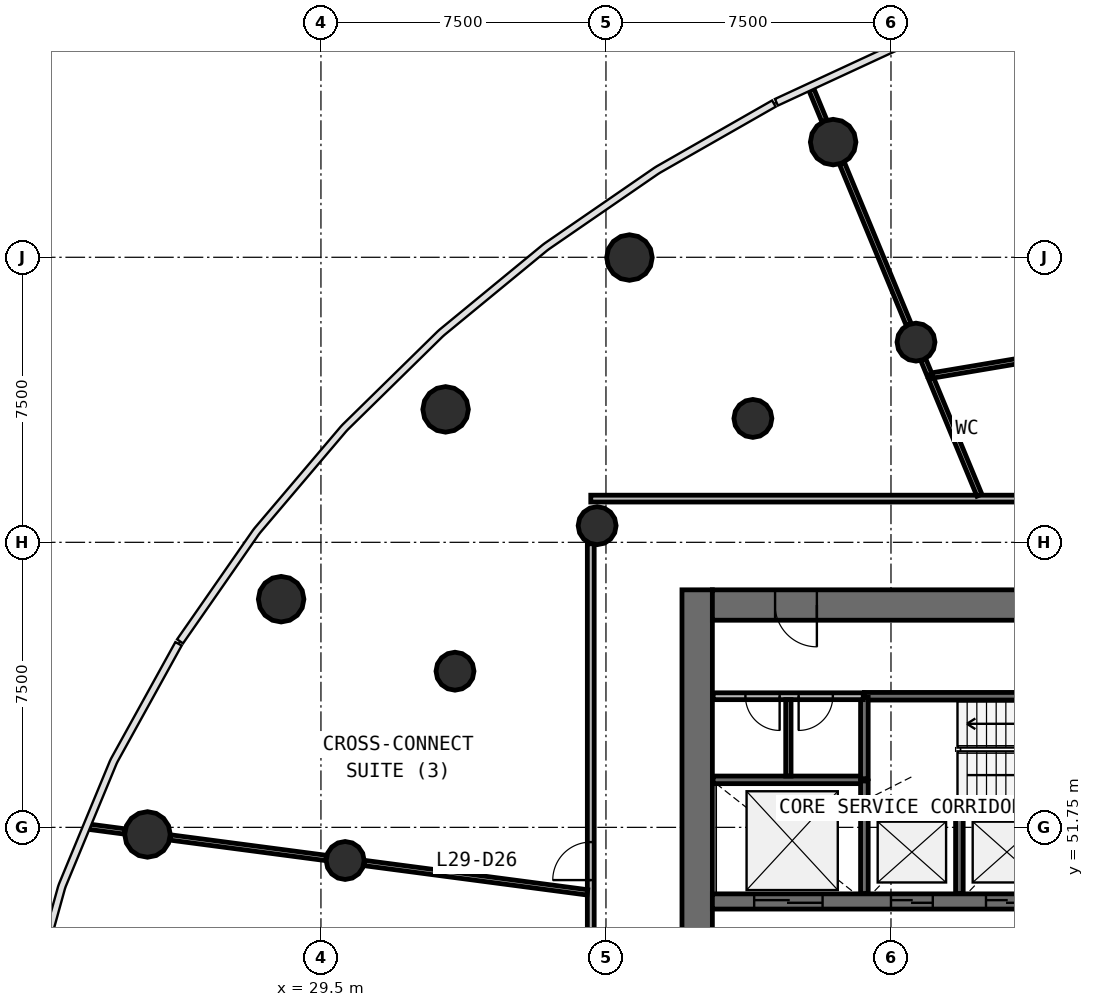
"""IFC4 building model, lengths in metres.
Left out: names, types, materials, properties, quantities, classifications, styles, units other than length and angle.
Written with IfcOpenShell. Run it as: python <this file> out.ifc"""

import sys

from ifc_helpers import new_model, si_unit, direction, frame, frame_2d, origin, origin_2d, place, context, subcontext, project, spatial, rectangle, circle, extrude, source, transform, mapped, element, fill, save


model = new_model("IFC4")
c1 = context("Model", 3, precision=1e-05, world=origin(), true_north=direction((0.0, 1.0)))
c2 = subcontext(c1, "Body", "Model", "MODEL_VIEW")
j1 = project(units=[si_unit("LENGTHUNIT", "METRE"), si_unit("PLANEANGLEUNIT", "RADIAN")], contexts=[c1])
p1 = place(None, origin())
s1 = spatial("IfcSite", under=j1, at=p1, CompositionType="ELEMENT")
p2 = place(p1, origin())
s2 = spatial("IfcBuilding", under=s1, at=p2, CompositionType="ELEMENT")
p3 = place(p2, frame((0.0, 0.0, 124.9)))
s3 = spatial("IfcBuildingStorey", under=s2, at=p3, CompositionType="ELEMENT", Elevation=124.9)
p4 = place(p3, frame((39.4, 58.0, 0.0), z_axis=(0.0, 0.0, 1.0), x_axis=(0.0, -1.0, 0.0)))
e1 = element("IfcWall", 1, at=p4, inside=s3, PredefinedType="SHEAR", context=c2, shape_type="SweptSolid", body=[
    extrude(rectangle(XDim=20.0, YDim=0.8, at=frame_2d((10.0, 0.0))), origin(), (0.0, 0.0, 1.0), 4.1),
])
p5 = place(p4, frame((9.1, 0.0, 0.0)))
e2 = element("IfcOpeningElement", 2, at=p5, cuts=e1, PredefinedType="OPENING", context=c2, shape_type="SweptSolid", body=[
    extrude(rectangle(XDim=1.8, YDim=2.1, at=frame_2d((0.9, 1.05))), frame((0.0, 0.41, 0.0), z_axis=(0.0, -1.0, 0.0), x_axis=(1.0, 0.0, 0.0)), (0.0, 0.0, 1.0), 0.82),
])
p6 = place(p3, frame((64.2, 57.6, 0.0), z_axis=(0.0, 0.0, 1.0), x_axis=(-1.0, 0.0, 0.0)))
e3 = element("IfcWall", 3, at=p6, inside=s3, PredefinedType="SHEAR", context=c2, shape_type="SweptSolid", body=[
    extrude(rectangle(XDim=24.4, YDim=0.8, at=frame_2d((12.2, 0.0))), origin(), (0.0, 0.0, 1.0), 4.1),
])
p7 = place(p6, frame((21.65, 0.0, 0.0)))
e4 = element("IfcOpeningElement", 4, at=p7, cuts=e3, PredefinedType="OPENING", context=c2, shape_type="SweptSolid", body=[
    extrude(rectangle(XDim=1.1, YDim=2.1, at=frame_2d((0.55, 1.05))), frame((0.0, 0.41, 0.0), z_axis=(0.0, -1.0, 0.0), x_axis=(1.0, 0.0, 0.0)), (0.0, 0.0, 1.0), 0.82),
])
p8 = place(p6, frame((2.15, 0.0, 0.0)))
e5 = element("IfcOpeningElement", 5, at=p8, cuts=e3, PredefinedType="OPENING", context=c2, shape_type="SweptSolid", body=[
    extrude(rectangle(XDim=1.1, YDim=2.1, at=frame_2d((0.55, 1.05))), frame((0.0, 0.41, 0.0), z_axis=(0.0, -1.0, 0.0), x_axis=(1.0, 0.0, 0.0)), (0.0, 0.0, 1.0), 0.82),
])
p9 = place(p3, frame((39.8, 49.8, 0.0), z_axis=(0.0, 0.0, 1.0), x_axis=(1.0, 0.0, 0.0)))
e6 = element("IfcWall", 6, at=p9, inside=s3, PredefinedType="SHEAR", context=c2, shape_type="SweptSolid", body=[
    extrude(rectangle(XDim=24.4, YDim=0.4, at=frame_2d((12.2, 0.0))), origin(), (0.0, 0.0, 1.0), 4.1),
])
p10 = place(p9, frame((4.7, 0.0, 0.0)))
e7 = element("IfcOpeningElement", 7, at=p10, cuts=e6, PredefinedType="OPENING", context=c2, shape_type="SweptSolid", body=[
    extrude(rectangle(XDim=1.1, YDim=2.1, at=frame_2d((0.55, 1.05))), frame((0.0, 0.21, 0.0), z_axis=(0.0, -1.0, 0.0), x_axis=(1.0, 0.0, 0.0)), (0.0, 0.0, 1.0), 0.42),
])
p11 = place(p9, frame((7.2, 0.0, 0.0)))
e8 = element("IfcOpeningElement", 8, at=p11, cuts=e6, PredefinedType="OPENING", context=c2, shape_type="SweptSolid", body=[
    extrude(rectangle(XDim=1.1, YDim=2.1, at=frame_2d((0.55, 1.05))), frame((0.0, 0.21, 0.0), z_axis=(0.0, -1.0, 0.0), x_axis=(1.0, 0.0, 0.0)), (0.0, 0.0, 1.0), 0.42),
])
p12 = place(p9, frame((9.7, 0.0, 0.0)))
e9 = element("IfcOpeningElement", 9, at=p12, cuts=e6, PredefinedType="OPENING", context=c2, shape_type="SweptSolid", body=[
    extrude(rectangle(XDim=1.1, YDim=2.1, at=frame_2d((0.55, 1.05))), frame((0.0, 0.21, 0.0), z_axis=(0.0, -1.0, 0.0), x_axis=(1.0, 0.0, 0.0)), (0.0, 0.0, 1.0), 0.42),
])
p13 = place(p9, frame((1.1, 0.0, 0.0)))
e10 = element("IfcOpeningElement", 10, at=p13, cuts=e6, PredefinedType="OPENING", context=c2, shape_type="SweptSolid", body=[
    extrude(rectangle(XDim=1.8, YDim=2.4, at=frame_2d((0.9, 1.2))), frame((0.0, 0.21, 0.0), z_axis=(0.0, -1.0, 0.0), x_axis=(1.0, 0.0, 0.0)), (0.0, 0.0, 1.0), 0.42),
])
p14 = place(p9, frame((20.65, 0.0, 0.0)))
e11 = element("IfcOpeningElement", 11, at=p14, cuts=e6, PredefinedType="OPENING", context=c2, shape_type="SweptSolid", body=[
    extrude(rectangle(XDim=0.9, YDim=2.1, at=frame_2d((0.45, 1.05))), frame((0.0, 0.21, 0.0), z_axis=(0.0, -1.0, 0.0), x_axis=(1.0, 0.0, 0.0)), (0.0, 0.0, 1.0), 0.42),
])
p15 = place(p9, frame((11.85, 0.0, 0.0)))
e12 = element("IfcOpeningElement", 12, at=p15, cuts=e6, PredefinedType="OPENING", context=c2, shape_type="SweptSolid", body=[
    extrude(rectangle(XDim=0.9, YDim=2.1, at=frame_2d((0.45, 1.05))), frame((0.0, 0.21, 0.0), z_axis=(0.0, -1.0, 0.0), x_axis=(1.0, 0.0, 0.0)), (0.0, 0.0, 1.0), 0.42),
])
m1 = source(origin(), c2, "Body", "SweptSolid", [
    extrude(circle(Radius=0.6, at=origin_2d()), origin(), (0.0, 0.0, 1.0), 4.1),
])
for number, where, z_axis, x_axis in (
    (13, (42.978, 69.781, 0.0), (0.0, 0.0, 1.0), (1.0, 0.0, 0.0)),
    (14, (37.618, 66.743, 0.0), (0.0, 0.0, 1.0), (1.0, 0.0, 0.0)),
    (15, (32.78, 62.748, 0.0), (0.0, 0.0, 1.0), (1.0, 0.0, 0.0)),
    (16, (28.452, 57.754, 0.0), (0.0, 0.0, 1.0), (1.0, 0.0, 0.0)),
    (17, (24.936, 51.563, 0.0), (0.0, 0.0, 1.0), (1.0, 0.0, 0.0)),
):
    element("IfcColumn", number, at=place(p3, frame(where, z_axis=z_axis, x_axis=x_axis)), inside=s3, PredefinedType="COLUMN", context=c2, shape_type="MappedRepresentation", body=[
        mapped(m1, transform((0.0, 0.0, 0.0), scale=1.0)),
    ])
m2 = source(origin(), c2, "Body", "SweptSolid", [
    extrude(circle(Radius=0.5, at=origin_2d()), origin(), (0.0, 0.0, 1.0), 4.1),
])
for number, where, z_axis, x_axis in (
    (18, (45.158, 64.518, 0.0), (0.0, 0.0, 1.0), (1.0, 0.0, 0.0)),
    (19, (40.866, 62.51, 0.0), (0.0, 0.0, 1.0), (1.0, 0.0, 0.0)),
    (20, (36.768, 59.688, 0.0), (0.0, 0.0, 1.0), (1.0, 0.0, 0.0)),
    (21, (33.028, 55.859, 0.0), (0.0, 0.0, 1.0), (1.0, 0.0, 0.0)),
    (22, (30.137, 50.878, 0.0), (0.0, 0.0, 1.0), (1.0, 0.0, 0.0)),
):
    element("IfcColumn", number, at=place(p3, frame(where, z_axis=z_axis, x_axis=x_axis)), inside=s3, PredefinedType="COLUMN", context=c2, shape_type="MappedRepresentation", body=[
        mapped(m2, transform((0.0, 0.0, 0.0), scale=1.0)),
    ])
p16 = place(p3, frame((50.4, 55.2, 0.0), z_axis=(0.0, 0.0, 1.0), x_axis=(-1.0, 0.0, 0.0)))
e23 = element("IfcWall", 23, at=p16, inside=s3, PredefinedType="SOLIDWALL", context=c2, shape_type="SweptSolid", body=[
    extrude(rectangle(XDim=6.6, YDim=0.2, at=frame_2d((3.3, 0.0))), origin(), (0.0, 0.0, 1.0), 3.6),
])
p17 = place(p16, frame((0.3, 0.0, 0.0)))
e24 = element("IfcOpeningElement", 24, at=p17, cuts=e23, PredefinedType="OPENING", context=c2, shape_type="SweptSolid", body=[
    extrude(rectangle(XDim=1.2, YDim=2.1, at=frame_2d((0.6, 1.05))), frame((0.0, 0.11, 0.0), z_axis=(0.0, -1.0, 0.0), x_axis=(1.0, 0.0, 0.0)), (0.0, 0.0, 1.0), 0.22),
])
p18 = place(p3, frame((43.8, 53.0, 0.0), z_axis=(0.0, 0.0, 1.0), x_axis=(-1.0, 0.0, 0.0)))
e25 = element("IfcWall", 25, at=p18, inside=s3, PredefinedType="SOLIDWALL", context=c2, shape_type="SweptSolid", body=[
    extrude(rectangle(XDim=3.98, YDim=0.2, at=frame_2d((1.99, 0.0))), origin(), (0.0, 0.0, 1.0), 3.6),
])
p19 = place(p3, frame((46.3, 52.4, 0.0), z_axis=(0.0, 0.0, 1.0), x_axis=(-1.0, 0.0, 0.0)))
e26 = element("IfcWall", 26, at=p19, inside=s3, PredefinedType="SOLIDWALL", context=c2, shape_type="SweptSolid", body=[
    extrude(rectangle(XDim=2.5, YDim=0.2, at=frame_2d((1.25, 0.0))), origin(), (0.0, 0.0, 1.0), 3.6),
])
p20 = place(p3, frame((48.8, 52.4, 0.0), z_axis=(0.0, 0.0, 1.0), x_axis=(-1.0, 0.0, 0.0)))
e27 = element("IfcWall", 27, at=p20, inside=s3, PredefinedType="SOLIDWALL", context=c2, shape_type="SweptSolid", body=[
    extrude(rectangle(XDim=2.47, YDim=0.2, at=frame_2d((1.235, 0.0))), origin(), (0.0, 0.0, 1.0), 3.6),
])
for number, where, z_axis, x_axis in (
    (28, (43.8, 52.37, 0.0), (0.0, 0.0, 1.0), (0.0, -1.0, 0.0)),
    (29, (46.3, 50.01, 0.0), (0.0, 0.0, 1.0), (0.0, 1.0, 0.0)),
):
    element("IfcWall", number, at=place(p3, frame(where, z_axis=z_axis, x_axis=x_axis)), inside=s3, PredefinedType="SOLIDWALL", context=c2, shape_type="SweptSolid", body=[
        extrude(rectangle(XDim=2.36, YDim=0.2, at=frame_2d((1.18, 0.0))), origin(), (0.0, 0.0, 1.0), 3.6),
    ])
p21 = place(p3, frame((43.8, 55.17, 0.0), z_axis=(0.0, 0.0, 1.0), x_axis=(0.0, -1.0, 0.0)))
e30 = element("IfcWall", 30, at=p21, inside=s3, PredefinedType="SOLIDWALL", context=c2, shape_type="SweptSolid", body=[
    extrude(rectangle(XDim=2.14, YDim=0.2, at=frame_2d((1.07, 0.0))), origin(), (0.0, 0.0, 1.0), 3.6),
])
p22 = place(p3, frame((43.8, 52.43, 0.0), z_axis=(0.0, 0.0, 1.0), x_axis=(0.0, 1.0, 0.0)))
e31 = element("IfcWall", 31, at=p22, inside=s3, PredefinedType="SOLIDWALL", context=c2, shape_type="SweptSolid", body=[
    extrude(rectangle(XDim=0.54, YDim=0.2, at=frame_2d((0.27, 0.0))), origin(), (0.0, 0.0, 1.0), 3.6),
])
p23 = place(p3, frame((36.6, 60.4, 0.0), z_axis=(0.0, 0.0, 1.0), x_axis=(1.0, 0.0, 0.0)))
e32 = element("IfcWall", 32, at=p23, inside=s3, PredefinedType="PARTITIONING", context=c2, shape_type="SweptSolid", body=[
    extrude(rectangle(XDim=30.8, YDim=0.18, at=frame_2d((15.4, 0.0))), origin(), (0.0, 0.0, 1.0), 2.8),
])
p24 = place(p23, frame((14.85, 0.0, 0.0)))
e33 = element("IfcOpeningElement", 33, at=p24, cuts=e32, PredefinedType="OPENING", context=c2, shape_type="SweptSolid", body=[
    extrude(rectangle(XDim=0.9, YDim=2.1, at=frame_2d((0.45, 1.05))), frame((0.0, 0.1, 0.0), z_axis=(0.0, -1.0, 0.0), x_axis=(1.0, 0.0, 0.0)), (0.0, 0.0, 1.0), 0.2),
])
p25 = place(p23, frame((12.65, 0.0, 0.0)))
e34 = element("IfcOpeningElement", 34, at=p25, cuts=e32, PredefinedType="OPENING", context=c2, shape_type="SweptSolid", body=[
    extrude(rectangle(XDim=0.9, YDim=2.1, at=frame_2d((0.45, 1.05))), frame((0.0, 0.1, 0.0), z_axis=(0.0, -1.0, 0.0), x_axis=(1.0, 0.0, 0.0)), (0.0, 0.0, 1.0), 0.2),
])
p26 = place(p23, frame((20.95, 0.0, 0.0)))
e35 = element("IfcOpeningElement", 35, at=p26, cuts=e32, PredefinedType="OPENING", context=c2, shape_type="SweptSolid", body=[
    extrude(rectangle(XDim=1.0, YDim=2.1, at=frame_2d((0.5, 1.05))), frame((0.0, 0.1, 0.0), z_axis=(0.0, -1.0, 0.0), x_axis=(1.0, 0.0, 0.0)), (0.0, 0.0, 1.0), 0.2),
])
p27 = place(p23, frame((17.35, 0.0, 0.0)))
e36 = element("IfcOpeningElement", 36, at=p27, cuts=e32, PredefinedType="OPENING", context=c2, shape_type="SweptSolid", body=[
    extrude(rectangle(XDim=1.0, YDim=2.1, at=frame_2d((0.5, 1.05))), frame((0.0, 0.1, 0.0), z_axis=(0.0, -1.0, 0.0), x_axis=(1.0, 0.0, 0.0)), (0.0, 0.0, 1.0), 0.2),
])
p28 = place(p3, frame((36.6, 35.63, 0.0), z_axis=(0.0, 0.0, 1.0), x_axis=(0.0, 1.0, 0.0)))
e37 = element("IfcWall", 37, at=p28, inside=s3, PredefinedType="PARTITIONING", context=c2, shape_type="SweptSolid", body=[
    extrude(rectangle(XDim=23.583, YDim=0.18, at=frame_2d((11.791, 0.0))), origin(), (0.0, 0.0, 1.0), 2.8),
])
p29 = place(p28, frame((14.732, 0.0, 0.0)))
e38 = element("IfcOpeningElement", 38, at=p29, cuts=e37, PredefinedType="OPENING", context=c2, shape_type="SweptSolid", body=[
    extrude(rectangle(XDim=1.0, YDim=2.1, at=frame_2d((0.5, 1.05))), frame((0.0, 0.1, 0.0), z_axis=(0.0, -1.0, 0.0), x_axis=(1.0, 0.0, 0.0)), (0.0, 0.0, 1.0), 0.2),
])
p30 = place(p28, frame((11.333, 0.0, 0.0)))
e39 = element("IfcOpeningElement", 39, at=p30, cuts=e37, PredefinedType="OPENING", context=c2, shape_type="SweptSolid", body=[
    extrude(rectangle(XDim=1.0, YDim=2.1, at=frame_2d((0.5, 1.05))), frame((0.0, 0.1, 0.0), z_axis=(0.0, -1.0, 0.0), x_axis=(1.0, 0.0, 0.0)), (0.0, 0.0, 1.0), 0.2),
])
p31 = place(p28, frame((9.133, 0.0, 0.0)))
e40 = element("IfcOpeningElement", 40, at=p31, cuts=e37, PredefinedType="OPENING", context=c2, shape_type="SweptSolid", body=[
    extrude(rectangle(XDim=1.0, YDim=2.1, at=frame_2d((0.5, 1.05))), frame((0.0, 0.1, 0.0), z_axis=(0.0, -1.0, 0.0), x_axis=(1.0, 0.0, 0.0)), (0.0, 0.0, 1.0), 0.2),
])
p32 = place(p3, frame((43.77, 55.2, 0.0), z_axis=(0.0, 0.0, 1.0), x_axis=(-1.0, 0.0, 0.0)))
e41 = element("IfcWall", 41, at=p32, inside=s3, PredefinedType="PARTITIONING", context=c2, shape_type="SweptSolid", body=[
    extrude(rectangle(XDim=3.95, YDim=0.18, at=frame_2d((1.975, 0.0))), origin(), (0.0, 0.0, 1.0), 3.6),
])
p33 = place(p32, frame((2.2, 0.0, 0.0)))
e42 = element("IfcOpeningElement", 42, at=p33, cuts=e41, PredefinedType="OPENING", context=c2, shape_type="SweptSolid", body=[
    extrude(rectangle(XDim=0.9, YDim=2.1, at=frame_2d((0.45, 1.05))), frame((0.0, 0.1, 0.0), z_axis=(0.0, -1.0, 0.0), x_axis=(1.0, 0.0, 0.0)), (0.0, 0.0, 1.0), 0.2),
])
p34 = place(p32, frame((0.8, 0.0, 0.0)))
e43 = element("IfcOpeningElement", 43, at=p34, cuts=e41, PredefinedType="OPENING", context=c2, shape_type="SweptSolid", body=[
    extrude(rectangle(XDim=0.9, YDim=2.1, at=frame_2d((0.45, 1.05))), frame((0.0, 0.1, 0.0), z_axis=(0.0, -1.0, 0.0), x_axis=(1.0, 0.0, 0.0)), (0.0, 0.0, 1.0), 0.2),
])
p35 = place(p3, frame((36.51, 50.039, 0.0), z_axis=(0.0, 0.0, 1.0), x_axis=(-0.991445034615, 0.130524876315, 0.0)))
e44 = element("IfcWall", 44, at=p35, inside=s3, PredefinedType="PARTITIONING", context=c2, shape_type="SweptSolid", body=[
    extrude(rectangle(XDim=5.924, YDim=0.14, at=frame_2d((2.962, 0.0))), origin(), (0.0, 0.0, 1.0), 2.8),
])
p36 = place(p3, frame((44.965, 64.984, 0.0), z_axis=(0.0, 0.0, 1.0), x_axis=(-0.382705930348, 0.923870213221, 0.0)))
e45 = element("IfcWall", 45, at=p36, inside=s3, PredefinedType="PARTITIONING", context=c2, shape_type="SweptSolid", body=[
    extrude(rectangle(XDim=4.587, YDim=0.14, at=frame_2d((2.293, 0.0))), origin(), (0.0, 0.0, 1.0), 2.8),
])
p37 = place(p3, frame((49.846, 64.358, 0.0), z_axis=(0.0, 0.0, 1.0), x_axis=(-0.986107812708, -0.166106537248, 0.0)))
e46 = element("IfcWall", 46, at=p37, inside=s3, PredefinedType="PARTITIONING", context=c2, shape_type="SweptSolid", body=[
    extrude(rectangle(XDim=4.381, YDim=0.14, at=frame_2d((2.191, 0.0))), origin(), (0.0, 0.0, 1.0), 2.8),
])
p38 = place(p3, frame((29.637, 50.944, 0.0), z_axis=(0.0, 0.0, 1.0), x_axis=(-0.991445054296, 0.130524726824, 0.0)))
e47 = element("IfcWall", 47, at=p38, inside=s3, PredefinedType="PARTITIONING", context=c2, shape_type="SweptSolid", body=[
    extrude(rectangle(XDim=4.137, YDim=0.14, at=frame_2d((2.069, 0.0))), origin(), (0.0, 0.0, 1.0), 2.8),
])
p39 = place(p3, frame((46.826, 60.49, 0.0), z_axis=(0.0, 0.0, 1.0), x_axis=(-0.382649947996, 0.92389340148, 0.0)))
e48 = element("IfcWall", 48, at=p39, inside=s3, PredefinedType="PARTITIONING", context=c2, shape_type="SweptSolid", body=[
    extrude(rectangle(XDim=3.327, YDim=0.14, at=frame_2d((1.663, 0.0))), origin(), (0.0, 0.0, 1.0), 2.8),
])
p40 = place(p3, frame((41.8, 53.1, 0.0), z_axis=(0.0, 0.0, 1.0), x_axis=(0.0, 1.0, 0.0)))
e49 = element("IfcWall", 49, at=p40, inside=s3, PredefinedType="PARTITIONING", context=c2, shape_type="SweptSolid", body=[
    extrude(rectangle(XDim=2.01, YDim=0.14, at=frame_2d((1.005, 0.0))), origin(), (0.0, 0.0, 1.0), 2.8),
])
p41 = place(p3, frame((24.336, 51.642, 0.0), z_axis=(0.0, 0.0, 1.0), x_axis=(-0.991449038396, 0.130494460661, 0.0)))
e50 = element("IfcWall", 50, at=p41, inside=s3, PredefinedType="PARTITIONING", context=c2, shape_type="SweptSolid", body=[
    extrude(rectangle(XDim=0.948, YDim=0.14, at=frame_2d((0.474, 0.0))), origin(), (0.0, 0.0, 1.0), 2.8),
])
p42 = place(p3, frame((42.747, 70.34, 0.0), z_axis=(0.0, 0.0, 1.0), x_axis=(-0.382657128341, 0.923890427556, 0.0)))
e51 = element("IfcWall", 51, at=p42, inside=s3, PredefinedType="PARTITIONING", context=c2, shape_type="SweptSolid", body=[
    extrude(rectangle(XDim=0.895, YDim=0.14, at=frame_2d((0.447, 0.0))), origin(), (0.0, 0.0, 1.0), 2.8),
])
p43 = place(p3, frame((45.514, 63.657, 0.0), z_axis=(0.0, 0.0, 1.0), x_axis=(-0.382334916259, 0.924023815607, 0.0)))
e52 = element("IfcWall", 52, at=p43, inside=s3, PredefinedType="PARTITIONING", context=c2, shape_type="SweptSolid", body=[
    extrude(rectangle(XDim=0.426, YDim=0.14, at=frame_2d((0.213, 0.0))), origin(), (0.0, 0.0, 1.0), 2.8),
])
m3 = source(origin(), c2, "Body", "SweptSolid", [
    extrude(rectangle(XDim=1.1, YDim=2.1, at=frame_2d((0.55, 1.05))), frame((0.0, 0.025, 0.0), z_axis=(0.0, -1.0, 0.0), x_axis=(1.0, 0.0, 0.0)), (0.0, 0.0, 1.0), 0.05),
])
p44 = place(p10, origin())
e53 = element("IfcDoor", 53, at=p44, inside=s3, OperationType="DOUBLE_DOOR_SLIDING", PredefinedType="USERDEFINED", context=c2, shape_type="MappedRepresentation", body=[
    mapped(m3, transform((0.0, 0.0, 0.0), scale=1.0)),
])
fill(e7, e53)
p45 = place(p11, origin())
e54 = element("IfcDoor", 54, at=p45, inside=s3, OperationType="DOUBLE_DOOR_SLIDING", PredefinedType="USERDEFINED", context=c2, shape_type="MappedRepresentation", body=[
    mapped(m3, transform((0.0, 0.0, 0.0), scale=1.0)),
])
fill(e8, e54)
m4 = source(origin(), c2, "Body", "SweptSolid", [
    extrude(rectangle(XDim=1.8, YDim=2.4, at=frame_2d((0.9, 1.2))), frame((0.0, 0.025, 0.0), z_axis=(0.0, -1.0, 0.0), x_axis=(1.0, 0.0, 0.0)), (0.0, 0.0, 1.0), 0.05),
])
p46 = place(p13, origin())
e55 = element("IfcDoor", 55, at=p46, inside=s3, OperationType="DOUBLE_DOOR_SLIDING", PredefinedType="USERDEFINED", context=c2, shape_type="MappedRepresentation", body=[
    mapped(m4, transform((0.0, 0.0, 0.0), scale=1.0)),
])
fill(e10, e55)
m5 = source(origin(), c2, "Body", "SweptSolid", [
    extrude(rectangle(XDim=1.1, YDim=2.1, at=frame_2d((0.55, 1.05))), frame((0.0, 0.025, 0.0), z_axis=(0.0, -1.0, 0.0), x_axis=(1.0, 0.0, 0.0)), (0.0, 0.0, 1.0), 0.05),
])
p47 = place(p7, origin())
e56 = element("IfcDoor", 56, at=p47, inside=s3, OperationType="SINGLE_SWING_LEFT", PredefinedType="DOOR", context=c2, shape_type="MappedRepresentation", body=[
    mapped(m5, transform((0.0, 0.0, 0.0), scale=1.0)),
])
fill(e4, e56)
m6 = source(origin(), c2, "Body", "SweptSolid", [
    extrude(rectangle(XDim=1.0, YDim=2.1, at=frame_2d((0.5, 1.05))), frame((0.0, 0.025, 0.0), z_axis=(0.0, -1.0, 0.0), x_axis=(1.0, 0.0, 0.0)), (0.0, 0.0, 1.0), 0.05),
])
p48 = place(p29, origin())
e57 = element("IfcDoor", 57, at=p48, inside=s3, OperationType="SINGLE_SWING_LEFT", PredefinedType="DOOR", context=c2, shape_type="MappedRepresentation", body=[
    mapped(m6, transform((0.0, 0.0, 0.0), scale=1.0)),
])
fill(e38, e57)
m7 = source(origin(), c2, "Body", "SweptSolid", [
    extrude(rectangle(XDim=0.9, YDim=2.1, at=frame_2d((0.45, 1.05))), frame((0.0, 0.025, 0.0), z_axis=(0.0, -1.0, 0.0), x_axis=(1.0, 0.0, 0.0)), (0.0, 0.0, 1.0), 0.05),
])
p49 = place(p33, origin())
e58 = element("IfcDoor", 58, at=p49, inside=s3, OperationType="SINGLE_SWING_LEFT", PredefinedType="DOOR", context=c2, shape_type="MappedRepresentation", body=[
    mapped(m7, transform((0.0, 0.0, 0.0), scale=1.0)),
])
fill(e42, e58)
p50 = place(p34, origin())
e59 = element("IfcDoor", 59, at=p50, inside=s3, OperationType="SINGLE_SWING_RIGHT", PredefinedType="DOOR", context=c2, shape_type="MappedRepresentation", body=[
    mapped(m7, transform((0.0, 0.0, 0.0), scale=1.0)),
])
fill(e43, e59)
save(model, sys.argv[1])
